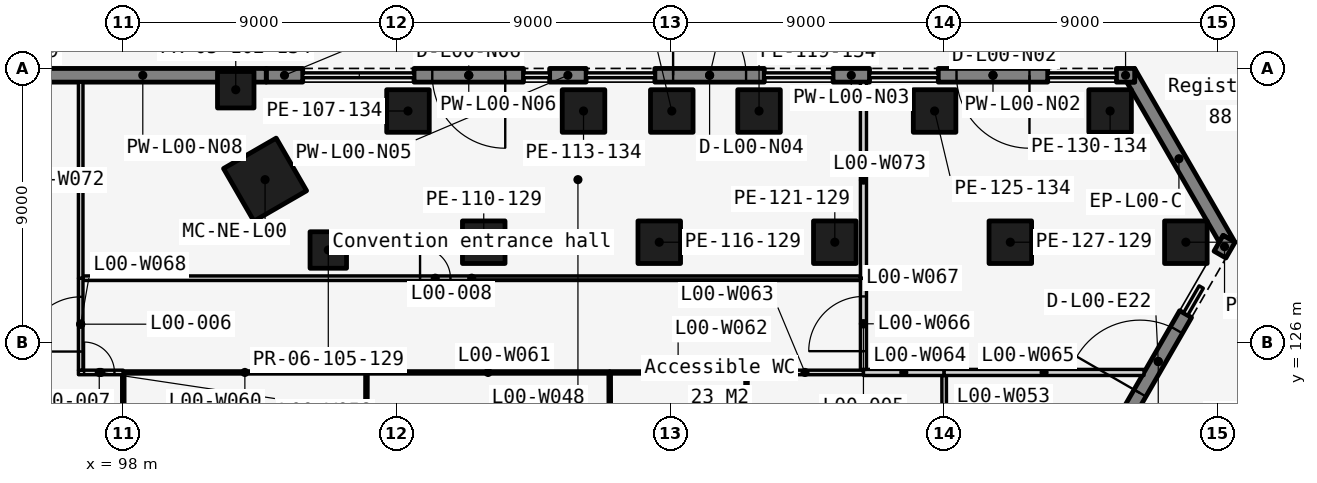
"""IFC4 building model, lengths in metres.
Left out: names, types, materials, properties, quantities, classifications, styles, units other than length and angle.
Written with IfcOpenShell. Run it as: python <this file> out.ifc"""

import sys

from ifc_helpers import new_model, si_unit, direction, frame, frame_2d, origin, origin_2d, place, context, subcontext, project, spatial, polyline, rectangle, outline, extrude, element, fill, save


model = new_model("IFC4")
c1 = context("Model", 3, precision=1e-05, world=origin(), true_north=direction((0.0, 1.0)))
c2 = subcontext(c1, "Body", "Model", "MODEL_VIEW")
j1 = project(units=[si_unit("LENGTHUNIT", "METRE"), si_unit("PLANEANGLEUNIT", "RADIAN")], contexts=[c1])
p1 = place(None, origin())
s1 = spatial("IfcSite", under=j1, at=p1, CompositionType="ELEMENT")
p2 = place(p1, origin())
s2 = spatial("IfcBuilding", under=s1, at=p2, CompositionType="ELEMENT")
p3 = place(p2, origin())
s3 = spatial("IfcBuildingStorey", under=s2, at=p3, CompositionType="ELEMENT", Elevation=0.0)
for number, where, z_axis, x_axis in (
    (1, (107.365, 133.6, 0.0), (0.0, 0.0, 1.0), (1.0, 0.0, 0.0)),
    (2, (109.857, 129.284, 0.0), (0.0, 0.0, 1.0), (1.0, 0.0, 0.0)),
    (3, (113.139, 133.6, 0.0), (0.0, 0.0, 1.0), (1.0, 0.0, 0.0)),
    (4, (115.63, 129.284, 0.0), (0.0, 0.0, 1.0), (1.0, 0.0, 0.0)),
    (5, (116.042, 133.6, 0.0), (0.0, 0.0, 1.0), (1.0, 0.0, 0.0)),
    (6, (118.912, 133.6, 0.0), (0.0, 0.0, 1.0), (1.0, 0.0, 0.0)),
    (7, (121.404, 129.284, 0.0), (0.0, 0.0, 1.0), (1.0, 0.0, 0.0)),
    (8, (124.686, 133.6, 0.0), (0.0, 0.0, 1.0), (1.0, 0.0, 0.0)),
    (9, (127.177, 129.284, 0.0), (0.0, 0.0, 1.0), (1.0, 0.0, 0.0)),
    (10, (130.459, 133.6, 0.0), (0.0, 0.0, 1.0), (1.0, 0.0, 0.0)),
    (11, (132.951, 129.284, 0.0), (0.0, 0.0, 1.0), (1.0, 0.0, 0.0)),
):
    element("IfcColumn", number, at=place(p3, frame(where, z_axis=z_axis, x_axis=x_axis)), inside=s3, PredefinedType="COLUMN", context=c2, shape_type="SweptSolid", body=[
        extrude(rectangle(XDim=1.4, YDim=1.4, at=origin_2d()), origin(), (0.0, 0.0, 1.0), 7.5),
    ])
for number, where, z_axis, x_axis in (
    (12, (101.7, 134.3, 0.0), (0.0, 0.0, 1.0), (1.0, 0.0, 0.0)),
    (13, (104.744, 129.028, 0.0), (0.0, 0.0, 1.0), (1.0, 0.0, 0.0)),
):
    element("IfcColumn", number, at=place(p3, frame(where, z_axis=z_axis, x_axis=x_axis)), inside=s3, PredefinedType="COLUMN", context=c2, shape_type="SweptSolid", body=[
        extrude(rectangle(XDim=1.2, YDim=1.2, at=origin_2d()), origin(), (0.0, 0.0, 1.0), 7.5),
    ])
p4 = place(p3, frame((102.664, 131.342, 0.0), z_axis=(0.0, 0.0, 1.0), x_axis=(-0.5, 0.866025403784, 0.0)))
e14 = element("IfcColumn", 14, at=p4, inside=s3, PredefinedType="COLUMN", context=c2, shape_type="SweptSolid", body=[
    extrude(rectangle(XDim=2.0, YDim=2.0, at=origin_2d()), origin(), (0.0, 0.0, 1.0), 7.5),
])
p5 = place(p3, frame((0.0, 0.0, -0.3)))
e15 = element("IfcWall", 15, at=p5, inside=s3, PredefinedType="SOLIDWALL", context=c2, shape_type="SweptSolid", body=[
    extrude(outline(polyline([(134.568, 129.284), (134.178, 129.509), (134.048, 129.284), (131.008, 134.55), (131.268, 134.55), (131.268, 135.0), (134.568, 129.284)])), origin(), (0.0, 0.0, 1.0), 6.812),
])
p6 = place(p3, frame((131.268, 134.775, -0.3), z_axis=(0.0, 0.0, 1.0), x_axis=(-1.0, 0.0, 0.0)))
e16 = element("IfcWall", 16, at=p6, inside=s3, PredefinedType="SOLIDWALL", context=c2, shape_type="SweptSolid", body=[
    extrude(rectangle(XDim=0.6, YDim=0.45, at=frame_2d((0.3, 0.0))), origin(), (0.0, 0.0, 1.0), 6.812),
])
p7 = place(p3, frame((128.407, 134.775, -0.3), z_axis=(0.0, 0.0, 1.0), x_axis=(-1.0, 0.0, 0.0)))
e17 = element("IfcWall", 17, at=p7, inside=s3, PredefinedType="SOLIDWALL", context=c2, shape_type="SweptSolid", body=[
    extrude(rectangle(XDim=3.6, YDim=0.45, at=frame_2d((1.8, 0.0))), origin(), (0.0, 0.0, 1.0), 6.812),
])
p8 = place(p7, frame((0.6, 0.0, 0.3)))
e18 = element("IfcOpeningElement", 18, at=p8, cuts=e17, PredefinedType="OPENING", context=c2, shape_type="SweptSolid", body=[
    extrude(rectangle(XDim=2.4, YDim=3.0, at=frame_2d((1.2, 1.5))), frame((0.0, 0.235, 0.0), z_axis=(0.0, -1.0, 0.0), x_axis=(1.0, 0.0, 0.0)), (0.0, 0.0, 1.0), 0.47),
])
p9 = place(p3, frame((122.546, 134.775, -0.3), z_axis=(0.0, 0.0, 1.0), x_axis=(-1.0, 0.0, 0.0)))
e19 = element("IfcWall", 19, at=p9, inside=s3, PredefinedType="SOLIDWALL", context=c2, shape_type="SweptSolid", body=[
    extrude(rectangle(XDim=1.2, YDim=0.45, at=frame_2d((0.6, 0.0))), origin(), (0.0, 0.0, 1.0), 6.812),
])
p10 = place(p3, frame((115.485, 134.775, -0.3), z_axis=(0.0, 0.0, 1.0), x_axis=(1.0, 0.0, 0.0)))
e20 = element("IfcWall", 20, at=p10, inside=s3, PredefinedType="SOLIDWALL", context=c2, shape_type="SweptSolid", body=[
    extrude(rectangle(XDim=3.6, YDim=0.45, at=frame_2d((1.8, 0.0))), origin(), (0.0, 0.0, 1.0), 6.812),
])
p11 = place(p10, frame((0.6, 0.0, 0.3)))
e21 = element("IfcOpeningElement", 21, at=p11, cuts=e20, PredefinedType="OPENING", context=c2, shape_type="SweptSolid", body=[
    extrude(rectangle(XDim=2.4, YDim=3.0, at=frame_2d((1.2, 1.5))), frame((0.0, 0.235, 0.0), z_axis=(0.0, -1.0, 0.0), x_axis=(1.0, 0.0, 0.0)), (0.0, 0.0, 1.0), 0.47),
])
p12 = place(p3, frame((113.225, 134.775, -0.3), z_axis=(0.0, 0.0, 1.0), x_axis=(-1.0, 0.0, 0.0)))
e22 = element("IfcWall", 22, at=p12, inside=s3, PredefinedType="SOLIDWALL", context=c2, shape_type="SweptSolid", body=[
    extrude(rectangle(XDim=1.2, YDim=0.45, at=frame_2d((0.6, 0.0))), origin(), (0.0, 0.0, 1.0), 6.812),
])
p13 = place(p3, frame((111.164, 134.775, -0.3), z_axis=(0.0, 0.0, 1.0), x_axis=(-1.0, 0.0, 0.0)))
e23 = element("IfcWall", 23, at=p13, inside=s3, PredefinedType="SOLIDWALL", context=c2, shape_type="SweptSolid", body=[
    extrude(rectangle(XDim=3.6, YDim=0.45, at=frame_2d((1.8, 0.0))), origin(), (0.0, 0.0, 1.0), 6.812),
])
p14 = place(p13, frame((0.6, 0.0, 0.3)))
e24 = element("IfcOpeningElement", 24, at=p14, cuts=e23, PredefinedType="OPENING", context=c2, shape_type="SweptSolid", body=[
    extrude(rectangle(XDim=2.4, YDim=3.0, at=frame_2d((1.2, 1.5))), frame((0.0, 0.235, 0.0), z_axis=(0.0, -1.0, 0.0), x_axis=(1.0, 0.0, 0.0)), (0.0, 0.0, 1.0), 0.47),
])
p15 = place(p3, frame((103.903, 134.775, -0.3), z_axis=(0.0, 0.0, 1.0), x_axis=(-1.0, 0.0, 0.0)))
e25 = element("IfcWall", 25, at=p15, inside=s3, PredefinedType="SOLIDWALL", context=c2, shape_type="SweptSolid", body=[
    extrude(rectangle(XDim=1.2, YDim=0.45, at=frame_2d((0.6, 0.0))), origin(), (0.0, 0.0, 1.0), 6.812),
])
p16 = place(p3, frame((102.703, 134.775, -0.3), z_axis=(0.0, 0.0, 1.0), x_axis=(-1.0, 0.0, 0.0)))
e26 = element("IfcWall", 26, at=p16, inside=s3, PredefinedType="SOLIDWALL", context=c2, shape_type="SweptSolid", body=[
    extrude(rectangle(XDim=8.121, YDim=0.45, at=frame_2d((4.061, 0.0))), origin(), (0.0, 0.0, 1.0), 6.812),
])
p17 = place(p3, frame((131.142, 123.802, -0.3), z_axis=(0.0, 0.0, 1.0), x_axis=(0.500012057535, 0.866018442252, 0.0)))
e27 = element("IfcWall", 27, at=p17, inside=s3, PredefinedType="SOLIDWALL", context=c2, shape_type="SweptSolid", body=[
    extrude(rectangle(XDim=3.6, YDim=0.45, at=frame_2d((1.8, 0.0))), origin(), (0.0, 0.0, 1.0), 6.812),
])
p18 = place(p17, frame((0.6, 0.0, 0.3)))
e28 = element("IfcOpeningElement", 28, at=p18, cuts=e27, PredefinedType="OPENING", context=c2, shape_type="SweptSolid", body=[
    extrude(rectangle(XDim=2.4, YDim=3.0, at=frame_2d((1.2, 1.5))), frame((0.0, 0.235, 0.0), z_axis=(0.0, -1.0, 0.0), x_axis=(1.0, 0.0, 0.0)), (0.0, 0.0, 1.0), 0.47),
])
p19 = place(p3, frame((134.073, 128.877, -0.3), z_axis=(0.0, 0.0, 1.0), x_axis=(0.499816412211, 0.866131372301, 0.0)))
e29 = element("IfcWall", 29, at=p19, inside=s3, PredefinedType="SOLIDWALL", context=c2, shape_type="SweptSolid", body=[
    extrude(rectangle(XDim=0.6, YDim=0.45, at=frame_2d((0.3, 0.0))), origin(), (0.0, 0.0, 1.0), 6.812),
])
for number, where, z_axis, x_axis in (
    (30, (105.99, 119.625, 0.0), (0.0, 0.0, 1.0), (0.002, 1.0, 0.0)),
    (31, (114.01, 119.625, 0.0), (0.0, 0.0, 1.0), (-0.002, 1.0, 0.0)),
    (32, (118.49, 119.625, 0.0), (0.0, 0.0, 1.0), (0.002, 1.0, 0.0)),
):
    element("IfcWall", number, at=place(p3, frame(where, z_axis=z_axis, x_axis=x_axis)), inside=s3, PredefinedType="PARTITIONING", context=c2, shape_type="SweptSolid", body=[
        extrude(rectangle(XDim=5.3, YDim=0.1, at=frame_2d((2.65, 0.0))), origin(), (0.0, 0.0, 1.0), 7.2),
    ])
p20 = place(p3, frame((125.01, 119.625, 0.0), z_axis=(0.0, 0.0, 1.0), x_axis=(-0.001805051211, 0.999998370894, 0.0)))
e33 = element("IfcWall", 33, at=p20, inside=s3, PredefinedType="PARTITIONING", context=c2, shape_type="SweptSolid", body=[
    extrude(rectangle(XDim=5.275, YDim=0.15, at=frame_2d((2.637, 0.0))), origin(), (0.0, 0.0, 1.0), 7.2),
])
p21 = place(p3, frame((96.525, 125.0, 0.0), z_axis=(0.0, 0.0, 1.0), x_axis=(1.0, 0.0, 0.0)))
e34 = element("IfcWall", 34, at=p21, inside=s3, PredefinedType="PARTITIONING", context=c2, shape_type="SweptSolid", body=[
    extrude(rectangle(XDim=1.475, YDim=0.15, at=frame_2d((0.737, 0.0))), origin(), (0.0, 0.0, 1.0), 7.2),
])
p22 = place(p21, frame((0.185, 0.0, 0.0)))
e35 = element("IfcOpeningElement", 35, at=p22, cuts=e34, PredefinedType="OPENING", context=c2, shape_type="SweptSolid", body=[
    extrude(rectangle(XDim=1.0, YDim=2.1, at=frame_2d((0.5, 1.05))), frame((0.0, 0.085, 0.0), z_axis=(0.0, -1.0, 0.0), x_axis=(1.0, 0.0, 0.0)), (0.0, 0.0, 1.0), 0.17),
])
p23 = place(p3, frame((98.0, 119.625, 0.0), z_axis=(0.0, 0.0, 1.0), x_axis=(-9.2127689e-05, 0.999999995756, 0.0)))
e36 = element("IfcWall", 36, at=p23, inside=s3, PredefinedType="PARTITIONING", context=c2, shape_type="SweptSolid", body=[
    extrude(rectangle(XDim=5.3, YDim=0.1, at=frame_2d((2.65, 0.0))), origin(), (0.0, 0.0, 1.0), 6.339),
])
for number, where, z_axis, x_axis in (
    (37, (98.0, 125.0, 0.0), (0.0, 0.0, 1.0), (1.0, 0.0, 0.0)),
    (38, (106.0, 125.0, 0.0), (0.0, 0.0, 1.0), (1.0, 0.0, 0.0)),
):
    element("IfcWall", number, at=place(p3, frame(where, z_axis=z_axis, x_axis=x_axis)), inside=s3, PredefinedType="PARTITIONING", context=c2, shape_type="SweptSolid", body=[
        extrude(rectangle(XDim=8.0, YDim=0.1, at=frame_2d((4.0, 0.0))), origin(), (0.0, 0.0, 1.0), 7.2),
    ])
p24 = place(p3, frame((114.0, 125.0, 0.0), z_axis=(0.0, 0.0, 1.0), x_axis=(1.0, 0.0, 0.0)))
e39 = element("IfcWall", 39, at=p24, inside=s3, PredefinedType="PARTITIONING", context=c2, shape_type="SweptSolid", body=[
    extrude(rectangle(XDim=4.5, YDim=0.1, at=frame_2d((2.25, 0.0))), origin(), (0.0, 0.0, 1.0), 7.2),
])
p25 = place(p3, frame((118.5, 125.0, 0.0), z_axis=(0.0, 0.0, 1.0), x_axis=(1.0, 0.0, 0.0)))
e40 = element("IfcWall", 40, at=p25, inside=s3, PredefinedType="PARTITIONING", context=c2, shape_type="SweptSolid", body=[
    extrude(rectangle(XDim=3.846, YDim=0.15, at=frame_2d((1.923, 0.0))), origin(), (0.0, 0.0, 1.0), 7.2),
])
p26 = place(p3, frame((122.346, 125.0, 0.0), z_axis=(0.0, 0.0, 1.0), x_axis=(1.0, 0.0, 0.0)))
e41 = element("IfcWall", 41, at=p26, inside=s3, PredefinedType="PARTITIONING", context=c2, shape_type="SweptSolid", body=[
    extrude(rectangle(XDim=2.654, YDim=0.2, at=frame_2d((1.327, 0.0))), origin(), (0.0, 0.0, 1.0), 7.2),
])
p27 = place(p3, frame((125.0, 125.0, 0.0), z_axis=(0.0, 0.0, 1.0), x_axis=(1.0, 0.0, 0.0)))
e42 = element("IfcWall", 42, at=p27, inside=s3, PredefinedType="PARTITIONING", context=c2, shape_type="SweptSolid", body=[
    extrude(rectangle(XDim=6.574, YDim=0.2, at=frame_2d((3.287, 0.0))), origin(), (0.0, 0.0, 1.0), 7.2),
])
p28 = place(p3, frame((122.346, 125.1, 0.0), z_axis=(0.0, 0.0, 1.0), x_axis=(0.0, 1.0, 0.0)))
e43 = element("IfcWall", 43, at=p28, inside=s3, PredefinedType="PARTITIONING", context=c2, shape_type="SweptSolid", body=[
    extrude(rectangle(XDim=3.0, YDim=0.2, at=frame_2d((1.5, 0.0))), origin(), (0.0, 0.0, 1.0), 7.2),
])
p29 = place(p28, frame((0.6, 0.0, 0.0)))
e44 = element("IfcOpeningElement", 44, at=p29, cuts=e43, PredefinedType="OPENING", context=c2, shape_type="SweptSolid", body=[
    extrude(rectangle(XDim=1.8, YDim=2.1, at=frame_2d((0.9, 1.05))), frame((0.0, 0.11, 0.0), z_axis=(0.0, -1.0, 0.0), x_axis=(1.0, 0.0, 0.0)), (0.0, 0.0, 1.0), 0.22),
])
p30 = place(p3, frame((96.675, 128.1, 0.0), z_axis=(0.0, 0.0, 1.0), x_axis=(1.0, 0.0, 0.0)))
e45 = element("IfcWall", 45, at=p30, inside=s3, PredefinedType="PARTITIONING", context=c2, shape_type="SweptSolid", body=[
    extrude(rectangle(XDim=25.571, YDim=0.15, at=frame_2d((12.786, 0.0))), origin(), (0.0, 0.0, 1.0), 7.2),
])
p31 = place(p30, frame((11.087, 0.0, 0.0)))
e46 = element("IfcOpeningElement", 46, at=p31, cuts=e45, PredefinedType="OPENING", context=c2, shape_type="SweptSolid", body=[
    extrude(rectangle(XDim=1.0, YDim=2.1, at=frame_2d((0.5, 1.05))), frame((0.0, 0.085, 0.0), z_axis=(0.0, -1.0, 0.0), x_axis=(1.0, 0.0, 0.0)), (0.0, 0.0, 1.0), 0.17),
])
p32 = place(p3, frame((96.601, 125.075, 0.0), z_axis=(0.0, 0.0, 1.0), x_axis=(-0.000161407471, 0.999999986974, 0.0)))
e47 = element("IfcWall", 47, at=p32, inside=s3, PredefinedType="PARTITIONING", context=c2, shape_type="SweptSolid", body=[
    extrude(rectangle(XDim=3.025, YDim=0.15, at=frame_2d((1.513, 0.0))), origin(), (0.0, 0.0, 1.0), 7.2),
])
p33 = place(p32, frame((0.613, 0.0, 0.0)))
e48 = element("IfcOpeningElement", 48, at=p33, cuts=e47, PredefinedType="OPENING", context=c2, shape_type="SweptSolid", body=[
    extrude(rectangle(XDim=1.8, YDim=2.1, at=frame_2d((0.9, 1.05))), frame((0.0, 0.085, 0.0), z_axis=(0.0, -1.0, 0.0), x_axis=(1.0, 0.0, 0.0)), (0.0, 0.0, 1.0), 0.17),
])
p34 = place(p3, frame((96.6, 128.1, 0.0), z_axis=(0.0, 0.0, 1.0), x_axis=(0.0, 1.0, 0.0)))
e49 = element("IfcWall", 49, at=p34, inside=s3, PredefinedType="PARTITIONING", context=c2, shape_type="SweptSolid", body=[
    extrude(rectangle(XDim=6.45, YDim=0.15, at=frame_2d((3.225, 0.0))), origin(), (0.0, 0.0, 1.0), 7.2),
])
p35 = place(p3, frame((122.346, 128.1, 0.0), z_axis=(0.0, 0.0, 1.0), x_axis=(0.0, 1.0, 0.0)))
e50 = element("IfcWall", 50, at=p35, inside=s3, PredefinedType="PARTITIONING", context=c2, shape_type="SweptSolid", body=[
    extrude(rectangle(XDim=6.45, YDim=0.2, at=frame_2d((3.225, 0.0))), origin(), (0.0, 0.0, 1.0), 7.2),
])
p36 = place(p8, origin())
e51 = element("IfcDoor", 51, at=p36, inside=s3, OperationType="DOUBLE_DOOR_SINGLE_SWING", PredefinedType="DOOR", context=c2, shape_type="SweptSolid", body=[
    extrude(rectangle(XDim=2.4, YDim=3.0, at=frame_2d((1.2, 1.5))), frame((0.0, 0.025, 0.0), z_axis=(0.0, -1.0, 0.0), x_axis=(1.0, 0.0, 0.0)), (0.0, 0.0, 1.0), 0.05),
])
fill(e18, e51)
p37 = place(p11, origin())
e52 = element("IfcDoor", 52, at=p37, inside=s3, OperationType="DOUBLE_DOOR_SINGLE_SWING", PredefinedType="DOOR", context=c2, shape_type="SweptSolid", body=[
    extrude(rectangle(XDim=2.4, YDim=3.0, at=frame_2d((1.2, 1.5))), frame((0.0, 0.025, 0.0), z_axis=(0.0, -1.0, 0.0), x_axis=(1.0, 0.0, 0.0)), (0.0, 0.0, 1.0), 0.05),
])
fill(e21, e52)
p38 = place(p14, origin())
e53 = element("IfcDoor", 53, at=p38, inside=s3, OperationType="DOUBLE_DOOR_SINGLE_SWING", PredefinedType="DOOR", context=c2, shape_type="SweptSolid", body=[
    extrude(rectangle(XDim=2.4, YDim=3.0, at=frame_2d((1.2, 1.5))), frame((0.0, 0.025, 0.0), z_axis=(0.0, -1.0, 0.0), x_axis=(1.0, 0.0, 0.0)), (0.0, 0.0, 1.0), 0.05),
])
fill(e24, e53)
p39 = place(p18, origin())
e54 = element("IfcDoor", 54, at=p39, inside=s3, OperationType="DOUBLE_DOOR_SINGLE_SWING", PredefinedType="DOOR", context=c2, shape_type="SweptSolid", body=[
    extrude(rectangle(XDim=2.4, YDim=3.0, at=frame_2d((1.2, 1.5))), frame((0.0, 0.025, 0.0), z_axis=(0.0, -1.0, 0.0), x_axis=(1.0, 0.0, 0.0)), (0.0, 0.0, 1.0), 0.05),
])
fill(e28, e54)
p40 = place(p29, origin())
e55 = element("IfcDoor", 55, at=p40, inside=s3, OperationType="SINGLE_SWING_LEFT", PredefinedType="DOOR", context=c2, shape_type="SweptSolid", body=[
    extrude(rectangle(XDim=1.8, YDim=2.1, at=frame_2d((0.9, 1.05))), frame((0.0, 0.025, 0.0), z_axis=(0.0, -1.0, 0.0), x_axis=(1.0, 0.0, 0.0)), (0.0, 0.0, 1.0), 0.05),
])
fill(e44, e55)
p41 = place(p33, origin())
e56 = element("IfcDoor", 56, at=p41, inside=s3, OperationType="SINGLE_SWING_LEFT", PredefinedType="DOOR", context=c2, shape_type="SweptSolid", body=[
    extrude(rectangle(XDim=1.8, YDim=2.1, at=frame_2d((0.9, 1.05))), frame((0.0, 0.025, 0.0), z_axis=(0.0, -1.0, 0.0), x_axis=(1.0, 0.0, 0.0)), (0.0, 0.0, 1.0), 0.05),
])
fill(e48, e56)
p42 = place(p22, origin())
e57 = element("IfcDoor", 57, at=p42, inside=s3, OperationType="SINGLE_SWING_LEFT", PredefinedType="DOOR", context=c2, shape_type="SweptSolid", body=[
    extrude(rectangle(XDim=1.0, YDim=2.1, at=frame_2d((0.5, 1.05))), frame((0.0, 0.025, 0.0), z_axis=(0.0, -1.0, 0.0), x_axis=(1.0, 0.0, 0.0)), (0.0, 0.0, 1.0), 0.05),
])
fill(e35, e57)
p43 = place(p31, origin())
e58 = element("IfcDoor", 58, at=p43, inside=s3, OperationType="SINGLE_SWING_LEFT", PredefinedType="DOOR", context=c2, shape_type="SweptSolid", body=[
    extrude(rectangle(XDim=1.0, YDim=2.1, at=frame_2d((0.5, 1.05))), frame((0.0, 0.025, 0.0), z_axis=(0.0, -1.0, 0.0), x_axis=(1.0, 0.0, 0.0)), (0.0, 0.0, 1.0), 0.05),
])
fill(e46, e58)
save(model, sys.argv[1])
